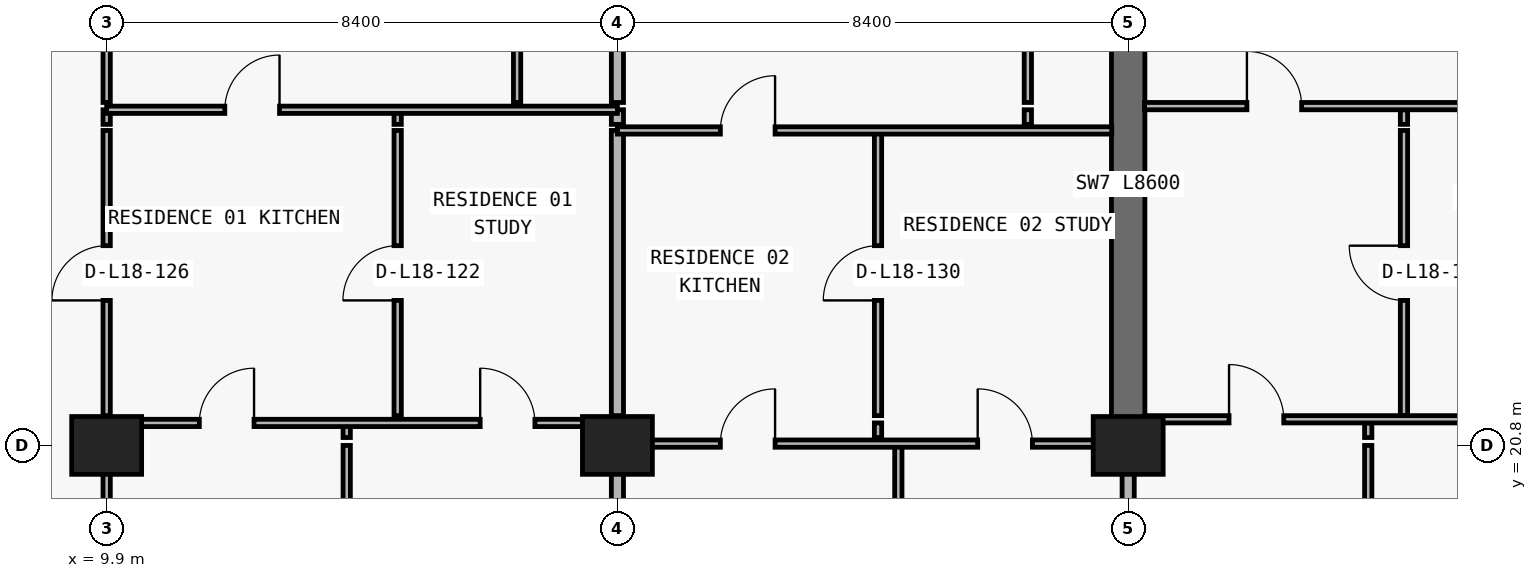
"""IFC4 building model, lengths in metres.
Left out: names, types, materials, properties, quantities, classifications, styles, units other than length and angle.
Written with IfcOpenShell. Run it as: python <this file> out.ifc"""

import sys

from ifc_helpers import new_model, si_unit, direction, frame, frame_2d, origin, origin_2d, place, context, subcontext, project, spatial, rectangle, extrude, element, fill, save


model = new_model("IFC4")
c1 = context("Model", 3, precision=1e-05, world=origin(), true_north=direction((0.0, 1.0)))
c2 = subcontext(c1, "Body", "Model", "MODEL_VIEW")
j1 = project(units=[si_unit("LENGTHUNIT", "METRE"), si_unit("PLANEANGLEUNIT", "RADIAN")], contexts=[c1])
p1 = place(None, origin())
s1 = spatial("IfcSite", under=j1, at=p1, CompositionType="ELEMENT")
p2 = place(p1, origin())
s2 = spatial("IfcBuilding", under=s1, at=p2, CompositionType="ELEMENT")
p3 = place(p2, frame((0.0, 0.0, 69.6)))
s3 = spatial("IfcBuildingStorey", under=s2, at=p3, CompositionType="ELEMENT", Elevation=69.6)
for number, where, z_axis, x_axis in (
    (1, (9.9, 20.8, 0.0), (0.0, 0.0, 1.0), (1.0, 0.0, 0.0)),
    (2, (18.3, 20.8, 0.0), (0.0, 0.0, 1.0), (1.0, 0.0, 0.0)),
    (3, (26.7, 20.8, 0.0), (0.0, 0.0, 1.0), (1.0, 0.0, 0.0)),
):
    element("IfcColumn", number, at=place(p3, frame(where, z_axis=z_axis, x_axis=x_axis)), inside=s3, PredefinedType="COLUMN", context=c2, shape_type="SweptSolid", body=[
        extrude(rectangle(XDim=1.15, YDim=0.95, at=origin_2d()), origin(), (0.0, 0.0, 1.0), 3.05),
    ])
p4 = place(p3, frame((26.7, 20.8, 0.0), z_axis=(0.0, 0.0, 1.0), x_axis=(0.0, 1.0, 0.0)))
e4 = element("IfcWall", 4, at=p4, inside=s3, PredefinedType="SHEAR", context=c2, shape_type="SweptSolid", body=[
    extrude(rectangle(XDim=8.6, YDim=0.55, at=frame_2d((4.3, 0.0))), origin(), (0.0, 0.0, 1.0), 3.05),
])
p5 = place(p3, frame((9.9, 6.24, 0.0), z_axis=(0.0, 0.0, 1.0), x_axis=(0.0, 1.0, 0.0)))
e5 = element("IfcWall", 5, at=p5, inside=s3, PredefinedType="PARTITIONING", context=c2, shape_type="SweptSolid", body=[
    extrude(rectangle(XDim=14.56, YDim=0.12, at=frame_2d((7.28, 0.0))), origin(), (0.0, 0.0, 1.0), 2.11),
])
p6 = place(p3, frame((9.9, 20.93, 0.0), z_axis=(0.0, 0.0, 1.0), x_axis=(0.0, 1.0, 0.0)))
e6 = element("IfcWall", 6, at=p6, inside=s3, PredefinedType="PARTITIONING", context=c2, shape_type="SweptSolid", body=[
    extrude(rectangle(XDim=0.24, YDim=0.12, at=frame_2d((0.12, 0.0))), origin(), (0.0, 0.0, 1.0), 3.05),
])
p7 = place(p3, frame((9.9, 21.29, 0.0), z_axis=(0.0, 0.0, 1.0), x_axis=(0.0, 1.0, 0.0)))
e7 = element("IfcWall", 7, at=p7, inside=s3, PredefinedType="PARTITIONING", context=c2, shape_type="SweptSolid", body=[
    extrude(rectangle(XDim=4.69, YDim=0.12, at=frame_2d((2.345, 0.0))), origin(), (0.0, 0.0, 1.0), 2.11),
])
p8 = place(p7, frame((1.895, 0.0, 0.0)))
e8 = element("IfcOpeningElement", 8, at=p8, cuts=e7, PredefinedType="OPENING", context=c2, shape_type="SweptSolid", body=[
    extrude(rectangle(XDim=0.9, YDim=2.06, at=frame_2d((0.45, 1.03))), frame((0.0, 0.07, 0.0), z_axis=(0.0, -1.0, 0.0), x_axis=(1.0, 0.0, 0.0)), (0.0, 0.0, 1.0), 0.14),
])
p9 = place(p3, frame((9.9, 26.08, 0.0), z_axis=(0.0, 0.0, 1.0), x_axis=(0.0, 1.0, 0.0)))
e9 = element("IfcWall", 9, at=p9, inside=s3, PredefinedType="PARTITIONING", context=c2, shape_type="SweptSolid", body=[
    extrude(rectangle(XDim=0.24, YDim=0.12, at=frame_2d((0.12, 0.0))), origin(), (0.0, 0.0, 1.0), 2.11),
])
p10 = place(p3, frame((9.9, 26.44, 0.0), z_axis=(0.0, 0.0, 1.0), x_axis=(0.0, 1.0, 0.0)))
e10 = element("IfcWall", 10, at=p10, inside=s3, PredefinedType="PARTITIONING", context=c2, shape_type="SweptSolid", body=[
    extrude(rectangle(XDim=8.26, YDim=0.12, at=frame_2d((4.13, 0.0))), origin(), (0.0, 0.0, 1.0), 2.11),
])
p11 = place(p3, frame((13.848, 6.24, 0.0), z_axis=(0.0, 0.0, 1.0), x_axis=(0.0, 1.0, 0.0)))
e11 = element("IfcWall", 11, at=p11, inside=s3, PredefinedType="PARTITIONING", context=c2, shape_type="SweptSolid", body=[
    extrude(rectangle(XDim=14.56, YDim=0.12, at=frame_2d((7.28, 0.0))), origin(), (0.0, 0.0, 1.0), 3.05),
])
p12 = place(p3, frame((13.848, 20.93, 0.0), z_axis=(0.0, 0.0, 1.0), x_axis=(0.0, 1.0, 0.0)))
e12 = element("IfcWall", 12, at=p12, inside=s3, PredefinedType="PARTITIONING", context=c2, shape_type="SweptSolid", body=[
    extrude(rectangle(XDim=0.24, YDim=0.12, at=frame_2d((0.12, 0.0))), origin(), (0.0, 0.0, 1.0), 3.05),
])
p13 = place(p3, frame((14.686, 21.29, 0.0), z_axis=(0.0, 0.0, 1.0), x_axis=(0.0, 1.0, 0.0)))
e13 = element("IfcWall", 13, at=p13, inside=s3, PredefinedType="PARTITIONING", context=c2, shape_type="SweptSolid", body=[
    extrude(rectangle(XDim=4.69, YDim=0.12, at=frame_2d((2.345, 0.0))), origin(), (0.0, 0.0, 1.0), 3.05),
])
p14 = place(p13, frame((1.895, 0.0, 0.0)))
e14 = element("IfcOpeningElement", 14, at=p14, cuts=e13, PredefinedType="OPENING", context=c2, shape_type="SweptSolid", body=[
    extrude(rectangle(XDim=0.9, YDim=2.15, at=frame_2d((0.45, 1.075))), frame((0.0, 0.07, 0.0), z_axis=(0.0, -1.0, 0.0), x_axis=(1.0, 0.0, 0.0)), (0.0, 0.0, 1.0), 0.14),
])
p15 = place(p3, frame((14.686, 26.08, 0.0), z_axis=(0.0, 0.0, 1.0), x_axis=(0.0, 1.0, 0.0)))
e15 = element("IfcWall", 15, at=p15, inside=s3, PredefinedType="PARTITIONING", context=c2, shape_type="SweptSolid", body=[
    extrude(rectangle(XDim=0.24, YDim=0.12, at=frame_2d((0.12, 0.0))), origin(), (0.0, 0.0, 1.0), 3.05),
])
p16 = place(p3, frame((16.65, 26.44, 0.0), z_axis=(0.0, 0.0, 1.0), x_axis=(0.0, 1.0, 0.0)))
e16 = element("IfcWall", 16, at=p16, inside=s3, PredefinedType="PARTITIONING", context=c2, shape_type="SweptSolid", body=[
    extrude(rectangle(XDim=8.26, YDim=0.12, at=frame_2d((4.13, 0.0))), origin(), (0.0, 0.0, 1.0), 3.05),
])
p17 = place(p16, frame((4.005, 0.0, 0.0)))
e17 = element("IfcOpeningElement", 17, at=p17, cuts=e16, PredefinedType="OPENING", context=c2, shape_type="SweptSolid", body=[
    extrude(rectangle(XDim=0.85, YDim=2.1, at=frame_2d((0.425, 1.05))), frame((0.0, 0.07, 0.0), z_axis=(0.0, -1.0, 0.0), x_axis=(1.0, 0.0, 0.0)), (0.0, 0.0, 1.0), 0.14),
])
p18 = place(p3, frame((18.3, 6.24, 0.0), z_axis=(0.0, 0.0, 1.0), x_axis=(0.0, 1.0, 0.0)))
e18 = element("IfcWall", 18, at=p18, inside=s3, PredefinedType="PARTITIONING", context=c2, shape_type="SweptSolid", body=[
    extrude(rectangle(XDim=14.56, YDim=0.2, at=frame_2d((7.28, 0.0))), origin(), (0.0, 0.0, 1.0), 2.11),
])
p19 = place(p3, frame((18.3, 20.93, 0.0), z_axis=(0.0, 0.0, 1.0), x_axis=(0.0, 1.0, 0.0)))
e19 = element("IfcWall", 19, at=p19, inside=s3, PredefinedType="PARTITIONING", context=c2, shape_type="SweptSolid", body=[
    extrude(rectangle(XDim=0.24, YDim=0.2, at=frame_2d((0.12, 0.0))), origin(), (0.0, 0.0, 1.0), 3.05),
])
p20 = place(p3, frame((18.3, 21.29, 0.0), z_axis=(0.0, 0.0, 1.0), x_axis=(0.0, 1.0, 0.0)))
e20 = element("IfcWall", 20, at=p20, inside=s3, PredefinedType="PARTITIONING", context=c2, shape_type="SweptSolid", body=[
    extrude(rectangle(XDim=4.69, YDim=0.2, at=frame_2d((2.345, 0.0))), origin(), (0.0, 0.0, 1.0), 2.11),
])
p21 = place(p3, frame((18.3, 26.08, 0.0), z_axis=(0.0, 0.0, 1.0), x_axis=(0.0, 1.0, 0.0)))
e21 = element("IfcWall", 21, at=p21, inside=s3, PredefinedType="PARTITIONING", context=c2, shape_type="SweptSolid", body=[
    extrude(rectangle(XDim=0.24, YDim=0.2, at=frame_2d((0.12, 0.0))), origin(), (0.0, 0.0, 1.0), 2.11),
])
p22 = place(p3, frame((18.3, 26.44, 0.0), z_axis=(0.0, 0.0, 1.0), x_axis=(0.0, 1.0, 0.0)))
e22 = element("IfcWall", 22, at=p22, inside=s3, PredefinedType="PARTITIONING", context=c2, shape_type="SweptSolid", body=[
    extrude(rectangle(XDim=8.26, YDim=0.2, at=frame_2d((4.13, 0.0))), origin(), (0.0, 0.0, 1.0), 2.11),
])
p23 = place(p3, frame((22.586, 20.93, 0.0), z_axis=(0.0, 0.0, 1.0), x_axis=(0.0, 1.0, 0.0)))
e23 = element("IfcWall", 23, at=p23, inside=s3, PredefinedType="PARTITIONING", context=c2, shape_type="SweptSolid", body=[
    extrude(rectangle(XDim=0.24, YDim=0.12, at=frame_2d((0.12, 0.0))), origin(), (0.0, 0.0, 1.0), 3.05),
])
p24 = place(p3, frame((22.586, 21.29, 0.0), z_axis=(0.0, 0.0, 1.0), x_axis=(0.0, 1.0, 0.0)))
e24 = element("IfcWall", 24, at=p24, inside=s3, PredefinedType="PARTITIONING", context=c2, shape_type="SweptSolid", body=[
    extrude(rectangle(XDim=4.69, YDim=0.12, at=frame_2d((2.345, 0.0))), origin(), (0.0, 0.0, 1.0), 3.05),
])
p25 = place(p24, frame((1.895, 0.0, 0.0)))
e25 = element("IfcOpeningElement", 25, at=p25, cuts=e24, PredefinedType="OPENING", context=c2, shape_type="SweptSolid", body=[
    extrude(rectangle(XDim=0.9, YDim=2.15, at=frame_2d((0.45, 1.075))), frame((0.0, 0.07, 0.0), z_axis=(0.0, -1.0, 0.0), x_axis=(1.0, 0.0, 0.0)), (0.0, 0.0, 1.0), 0.14),
])
p26 = place(p3, frame((22.92, 6.24, 0.0), z_axis=(0.0, 0.0, 1.0), x_axis=(0.0, 1.0, 0.0)))
e26 = element("IfcWall", 26, at=p26, inside=s3, PredefinedType="PARTITIONING", context=c2, shape_type="SweptSolid", body=[
    extrude(rectangle(XDim=14.56, YDim=0.12, at=frame_2d((7.28, 0.0))), origin(), (0.0, 0.0, 1.0), 3.05),
])
p27 = place(p3, frame((25.05, 26.08, 0.0), z_axis=(0.0, 0.0, 1.0), x_axis=(0.0, 1.0, 0.0)))
e27 = element("IfcWall", 27, at=p27, inside=s3, PredefinedType="PARTITIONING", context=c2, shape_type="SweptSolid", body=[
    extrude(rectangle(XDim=0.24, YDim=0.12, at=frame_2d((0.12, 0.0))), origin(), (0.0, 0.0, 1.0), 3.05),
])
p28 = place(p3, frame((25.05, 26.44, 0.0), z_axis=(0.0, 0.0, 1.0), x_axis=(0.0, 1.0, 0.0)))
e28 = element("IfcWall", 28, at=p28, inside=s3, PredefinedType="PARTITIONING", context=c2, shape_type="SweptSolid", body=[
    extrude(rectangle(XDim=8.26, YDim=0.12, at=frame_2d((4.13, 0.0))), origin(), (0.0, 0.0, 1.0), 3.05),
])
p29 = place(p28, frame((4.005, 0.0, 0.0)))
e29 = element("IfcOpeningElement", 29, at=p29, cuts=e28, PredefinedType="OPENING", context=c2, shape_type="SweptSolid", body=[
    extrude(rectangle(XDim=0.85, YDim=2.1, at=frame_2d((0.425, 1.05))), frame((0.0, 0.07, 0.0), z_axis=(0.0, -1.0, 0.0), x_axis=(1.0, 0.0, 0.0)), (0.0, 0.0, 1.0), 0.14),
])
p30 = place(p3, frame((26.7, 6.24, 0.0), z_axis=(0.0, 0.0, 1.0), x_axis=(0.0, 1.0, 0.0)))
e30 = element("IfcWall", 30, at=p30, inside=s3, PredefinedType="PARTITIONING", context=c2, shape_type="SweptSolid", body=[
    extrude(rectangle(XDim=14.555, YDim=0.2, at=frame_2d((7.277, 0.0))), origin(), (0.0, 0.0, 1.0), 2.11),
])
p31 = place(p3, frame((30.648, 6.24, 0.0), z_axis=(0.0, 0.0, 1.0), x_axis=(0.0, 1.0, 0.0)))
e31 = element("IfcWall", 31, at=p31, inside=s3, PredefinedType="PARTITIONING", context=c2, shape_type="SweptSolid", body=[
    extrude(rectangle(XDim=14.56, YDim=0.12, at=frame_2d((7.28, 0.0))), origin(), (0.0, 0.0, 1.0), 3.05),
])
p32 = place(p3, frame((30.648, 20.93, 0.0), z_axis=(0.0, 0.0, 1.0), x_axis=(0.0, 1.0, 0.0)))
e32 = element("IfcWall", 32, at=p32, inside=s3, PredefinedType="PARTITIONING", context=c2, shape_type="SweptSolid", body=[
    extrude(rectangle(XDim=0.24, YDim=0.12, at=frame_2d((0.12, 0.0))), origin(), (0.0, 0.0, 1.0), 3.05),
])
p33 = place(p3, frame((31.236, 21.29, 0.0), z_axis=(0.0, 0.0, 1.0), x_axis=(0.0, 1.0, 0.0)))
e33 = element("IfcWall", 33, at=p33, inside=s3, PredefinedType="PARTITIONING", context=c2, shape_type="SweptSolid", body=[
    extrude(rectangle(XDim=4.69, YDim=0.12, at=frame_2d((2.345, 0.0))), origin(), (0.0, 0.0, 1.0), 3.05),
])
p34 = place(p33, frame((1.895, 0.0, 0.0)))
e34 = element("IfcOpeningElement", 34, at=p34, cuts=e33, PredefinedType="OPENING", context=c2, shape_type="SweptSolid", body=[
    extrude(rectangle(XDim=0.9, YDim=2.15, at=frame_2d((0.45, 1.075))), frame((0.0, 0.07, 0.0), z_axis=(0.0, -1.0, 0.0), x_axis=(1.0, 0.0, 0.0)), (0.0, 0.0, 1.0), 0.14),
])
p35 = place(p3, frame((31.236, 26.08, 0.0), z_axis=(0.0, 0.0, 1.0), x_axis=(0.0, 1.0, 0.0)))
e35 = element("IfcWall", 35, at=p35, inside=s3, PredefinedType="PARTITIONING", context=c2, shape_type="SweptSolid", body=[
    extrude(rectangle(XDim=0.24, YDim=0.12, at=frame_2d((0.12, 0.0))), origin(), (0.0, 0.0, 1.0), 3.05),
])
p36 = place(p3, frame((18.3, 20.83, 0.0), z_axis=(0.0, 0.0, 1.0), x_axis=(1.0, 0.0, 0.0)))
e36 = element("IfcWall", 36, at=p36, inside=s3, PredefinedType="PARTITIONING", context=c2, shape_type="SweptSolid", body=[
    extrude(rectangle(XDim=8.13, YDim=0.12, at=frame_2d((4.065, 0.0))), origin(), (0.0, 0.0, 1.0), 2.11),
])
p37 = place(p36, frame((1.693, 0.0, 0.0)))
e37 = element("IfcOpeningElement", 37, at=p37, cuts=e36, PredefinedType="OPENING", context=c2, shape_type="SweptSolid", body=[
    extrude(rectangle(XDim=0.9, YDim=2.06, at=frame_2d((0.45, 1.03))), frame((0.0, 0.07, 0.0), z_axis=(0.0, -1.0, 0.0), x_axis=(1.0, 0.0, 0.0)), (0.0, 0.0, 1.0), 0.14),
])
p38 = place(p36, frame((5.925, 0.0, 0.0)))
e38 = element("IfcOpeningElement", 38, at=p38, cuts=e36, PredefinedType="OPENING", context=c2, shape_type="SweptSolid", body=[
    extrude(rectangle(XDim=0.9, YDim=2.06, at=frame_2d((0.45, 1.03))), frame((0.0, 0.07, 0.0), z_axis=(0.0, -1.0, 0.0), x_axis=(1.0, 0.0, 0.0)), (0.0, 0.0, 1.0), 0.14),
])
p39 = place(p3, frame((9.9, 21.17, 0.0), z_axis=(0.0, 0.0, 1.0), x_axis=(1.0, 0.0, 0.0)))
e39 = element("IfcWall", 39, at=p39, inside=s3, PredefinedType="PARTITIONING", context=c2, shape_type="SweptSolid", body=[
    extrude(rectangle(XDim=8.4, YDim=0.12, at=frame_2d((4.2, 0.0))), origin(), (0.0, 0.0, 1.0), 3.05),
])
p40 = place(p39, frame((1.524, 0.0, 0.0)))
e40 = element("IfcOpeningElement", 40, at=p40, cuts=e39, PredefinedType="OPENING", context=c2, shape_type="SweptSolid", body=[
    extrude(rectangle(XDim=0.9, YDim=2.15, at=frame_2d((0.45, 1.075))), frame((0.0, 0.07, 0.0), z_axis=(0.0, -1.0, 0.0), x_axis=(1.0, 0.0, 0.0)), (0.0, 0.0, 1.0), 0.14),
])
p41 = place(p39, frame((6.143, 0.0, 0.0)))
e41 = element("IfcOpeningElement", 41, at=p41, cuts=e39, PredefinedType="OPENING", context=c2, shape_type="SweptSolid", body=[
    extrude(rectangle(XDim=0.9, YDim=2.15, at=frame_2d((0.45, 1.075))), frame((0.0, 0.07, 0.0), z_axis=(0.0, -1.0, 0.0), x_axis=(1.0, 0.0, 0.0)), (0.0, 0.0, 1.0), 0.14),
])
p42 = place(p3, frame((26.97, 21.23, 0.0), z_axis=(0.0, 0.0, 1.0), x_axis=(1.0, 0.0, 0.0)))
e42 = element("IfcWall", 42, at=p42, inside=s3, PredefinedType="PARTITIONING", context=c2, shape_type="SweptSolid", body=[
    extrude(rectangle(XDim=8.13, YDim=0.12, at=frame_2d((4.065, 0.0))), origin(), (0.0, 0.0, 1.0), 3.05),
])
p43 = place(p42, frame((1.389, 0.0, 0.0)))
e43 = element("IfcOpeningElement", 43, at=p43, cuts=e42, PredefinedType="OPENING", context=c2, shape_type="SweptSolid", body=[
    extrude(rectangle(XDim=0.9, YDim=2.15, at=frame_2d((0.45, 1.075))), frame((0.0, 0.07, 0.0), z_axis=(0.0, -1.0, 0.0), x_axis=(1.0, 0.0, 0.0)), (0.0, 0.0, 1.0), 0.14),
])
p44 = place(p42, frame((5.748, 0.0, 0.0)))
e44 = element("IfcOpeningElement", 44, at=p44, cuts=e42, PredefinedType="OPENING", context=c2, shape_type="SweptSolid", body=[
    extrude(rectangle(XDim=0.9, YDim=2.15, at=frame_2d((0.45, 1.075))), frame((0.0, 0.07, 0.0), z_axis=(0.0, -1.0, 0.0), x_axis=(1.0, 0.0, 0.0)), (0.0, 0.0, 1.0), 0.14),
])
p45 = place(p3, frame((18.3, 25.98, 0.0), z_axis=(0.0, 0.0, 1.0), x_axis=(1.0, 0.0, 0.0)))
e45 = element("IfcWall", 45, at=p45, inside=s3, PredefinedType="PARTITIONING", context=c2, shape_type="SweptSolid", body=[
    extrude(rectangle(XDim=8.13, YDim=0.12, at=frame_2d((4.065, 0.0))), origin(), (0.0, 0.0, 1.0), 3.05),
])
p46 = place(p45, frame((1.693, 0.0, 0.0)))
e46 = element("IfcOpeningElement", 46, at=p46, cuts=e45, PredefinedType="OPENING", context=c2, shape_type="SweptSolid", body=[
    extrude(rectangle(XDim=0.9, YDim=2.15, at=frame_2d((0.45, 1.075))), frame((0.0, 0.07, 0.0), z_axis=(0.0, -1.0, 0.0), x_axis=(1.0, 0.0, 0.0)), (0.0, 0.0, 1.0), 0.14),
])
p47 = place(p3, frame((9.9, 26.32, 0.0), z_axis=(0.0, 0.0, 1.0), x_axis=(1.0, 0.0, 0.0)))
e47 = element("IfcWall", 47, at=p47, inside=s3, PredefinedType="PARTITIONING", context=c2, shape_type="SweptSolid", body=[
    extrude(rectangle(XDim=8.4, YDim=0.12, at=frame_2d((4.2, 0.0))), origin(), (0.0, 0.0, 1.0), 3.05),
])
p48 = place(p47, frame((1.943, 0.0, 0.0)))
e48 = element("IfcOpeningElement", 48, at=p48, cuts=e47, PredefinedType="OPENING", context=c2, shape_type="SweptSolid", body=[
    extrude(rectangle(XDim=0.9, YDim=2.15, at=frame_2d((0.45, 1.075))), frame((0.0, 0.07, 0.0), z_axis=(0.0, -1.0, 0.0), x_axis=(1.0, 0.0, 0.0)), (0.0, 0.0, 1.0), 0.14),
])
p49 = place(p3, frame((26.97, 26.38, 0.0), z_axis=(0.0, 0.0, 1.0), x_axis=(1.0, 0.0, 0.0)))
e49 = element("IfcWall", 49, at=p49, inside=s3, PredefinedType="PARTITIONING", context=c2, shape_type="SweptSolid", body=[
    extrude(rectangle(XDim=8.13, YDim=0.12, at=frame_2d((4.065, 0.0))), origin(), (0.0, 0.0, 1.0), 3.05),
])
p50 = place(p49, frame((1.683, 0.0, 0.0)))
e50 = element("IfcOpeningElement", 50, at=p50, cuts=e49, PredefinedType="OPENING", context=c2, shape_type="SweptSolid", body=[
    extrude(rectangle(XDim=0.9, YDim=2.15, at=frame_2d((0.45, 1.075))), frame((0.0, 0.07, 0.0), z_axis=(0.0, -1.0, 0.0), x_axis=(1.0, 0.0, 0.0)), (0.0, 0.0, 1.0), 0.14),
])
p51 = place(p48, origin())
e51 = element("IfcDoor", 51, at=p51, inside=s3, OperationType="SINGLE_SWING_RIGHT", PredefinedType="DOOR", context=c2, shape_type="SweptSolid", body=[
    extrude(rectangle(XDim=0.9, YDim=2.15, at=frame_2d((0.45, 1.075))), frame((0.0, 0.025, 0.0), z_axis=(0.0, -1.0, 0.0), x_axis=(1.0, 0.0, 0.0)), (0.0, 0.0, 1.0), 0.05),
])
fill(e48, e51)
p52 = place(p14, origin())
e52 = element("IfcDoor", 52, at=p52, inside=s3, OperationType="SINGLE_SWING_LEFT", PredefinedType="DOOR", context=c2, shape_type="SweptSolid", body=[
    extrude(rectangle(XDim=0.9, YDim=2.15, at=frame_2d((0.45, 1.075))), frame((0.0, 0.025, 0.0), z_axis=(0.0, -1.0, 0.0), x_axis=(1.0, 0.0, 0.0)), (0.0, 0.0, 1.0), 0.05),
])
fill(e14, e52)
p53 = place(p40, origin())
e53 = element("IfcDoor", 53, at=p53, inside=s3, OperationType="SINGLE_SWING_RIGHT", PredefinedType="DOOR", context=c2, shape_type="SweptSolid", body=[
    extrude(rectangle(XDim=0.9, YDim=2.15, at=frame_2d((0.45, 1.075))), frame((0.0, 0.025, 0.0), z_axis=(0.0, -1.0, 0.0), x_axis=(1.0, 0.0, 0.0)), (0.0, 0.0, 1.0), 0.05),
])
fill(e40, e53)
p54 = place(p41, origin())
e54 = element("IfcDoor", 54, at=p54, inside=s3, OperationType="SINGLE_SWING_LEFT", PredefinedType="DOOR", context=c2, shape_type="SweptSolid", body=[
    extrude(rectangle(XDim=0.9, YDim=2.15, at=frame_2d((0.45, 1.075))), frame((0.0, 0.025, 0.0), z_axis=(0.0, -1.0, 0.0), x_axis=(1.0, 0.0, 0.0)), (0.0, 0.0, 1.0), 0.05),
])
fill(e41, e54)
p55 = place(p8, origin())
e55 = element("IfcDoor", 55, at=p55, inside=s3, OperationType="SINGLE_SWING_LEFT", PredefinedType="DOOR", context=c2, shape_type="SweptSolid", body=[
    extrude(rectangle(XDim=0.9, YDim=2.06, at=frame_2d((0.45, 1.03))), frame((0.0, 0.025, 0.0), z_axis=(0.0, -1.0, 0.0), x_axis=(1.0, 0.0, 0.0)), (0.0, 0.0, 1.0), 0.05),
])
fill(e8, e55)
p56 = place(p46, origin())
e56 = element("IfcDoor", 56, at=p56, inside=s3, OperationType="SINGLE_SWING_RIGHT", PredefinedType="DOOR", context=c2, shape_type="SweptSolid", body=[
    extrude(rectangle(XDim=0.9, YDim=2.15, at=frame_2d((0.45, 1.075))), frame((0.0, 0.025, 0.0), z_axis=(0.0, -1.0, 0.0), x_axis=(1.0, 0.0, 0.0)), (0.0, 0.0, 1.0), 0.05),
])
fill(e46, e56)
p57 = place(p25, origin())
e57 = element("IfcDoor", 57, at=p57, inside=s3, OperationType="SINGLE_SWING_LEFT", PredefinedType="DOOR", context=c2, shape_type="SweptSolid", body=[
    extrude(rectangle(XDim=0.9, YDim=2.15, at=frame_2d((0.45, 1.075))), frame((0.0, 0.025, 0.0), z_axis=(0.0, -1.0, 0.0), x_axis=(1.0, 0.0, 0.0)), (0.0, 0.0, 1.0), 0.05),
])
fill(e25, e57)
p58 = place(p37, origin())
e58 = element("IfcDoor", 58, at=p58, inside=s3, OperationType="SINGLE_SWING_RIGHT", PredefinedType="DOOR", context=c2, shape_type="SweptSolid", body=[
    extrude(rectangle(XDim=0.9, YDim=2.06, at=frame_2d((0.45, 1.03))), frame((0.0, 0.025, 0.0), z_axis=(0.0, -1.0, 0.0), x_axis=(1.0, 0.0, 0.0)), (0.0, 0.0, 1.0), 0.05),
])
fill(e37, e58)
p59 = place(p38, origin())
e59 = element("IfcDoor", 59, at=p59, inside=s3, OperationType="SINGLE_SWING_LEFT", PredefinedType="DOOR", context=c2, shape_type="SweptSolid", body=[
    extrude(rectangle(XDim=0.9, YDim=2.06, at=frame_2d((0.45, 1.03))), frame((0.0, 0.025, 0.0), z_axis=(0.0, -1.0, 0.0), x_axis=(1.0, 0.0, 0.0)), (0.0, 0.0, 1.0), 0.05),
])
fill(e38, e59)
p60 = place(p50, origin())
e60 = element("IfcDoor", 60, at=p60, inside=s3, OperationType="SINGLE_SWING_LEFT", PredefinedType="DOOR", context=c2, shape_type="SweptSolid", body=[
    extrude(rectangle(XDim=0.9, YDim=2.15, at=frame_2d((0.45, 1.075))), frame((0.0, 0.025, 0.0), z_axis=(0.0, -1.0, 0.0), x_axis=(1.0, 0.0, 0.0)), (0.0, 0.0, 1.0), 0.05),
])
fill(e50, e60)
p61 = place(p34, origin())
e61 = element("IfcDoor", 61, at=p61, inside=s3, OperationType="SINGLE_SWING_RIGHT", PredefinedType="DOOR", context=c2, shape_type="SweptSolid", body=[
    extrude(rectangle(XDim=0.9, YDim=2.15, at=frame_2d((0.45, 1.075))), frame((0.0, 0.025, 0.0), z_axis=(0.0, -1.0, 0.0), x_axis=(1.0, 0.0, 0.0)), (0.0, 0.0, 1.0), 0.05),
])
fill(e34, e61)
p62 = place(p43, origin())
e62 = element("IfcDoor", 62, at=p62, inside=s3, OperationType="SINGLE_SWING_LEFT", PredefinedType="DOOR", context=c2, shape_type="SweptSolid", body=[
    extrude(rectangle(XDim=0.9, YDim=2.15, at=frame_2d((0.45, 1.075))), frame((0.0, 0.025, 0.0), z_axis=(0.0, -1.0, 0.0), x_axis=(1.0, 0.0, 0.0)), (0.0, 0.0, 1.0), 0.05),
])
fill(e43, e62)
save(model, sys.argv[1])
